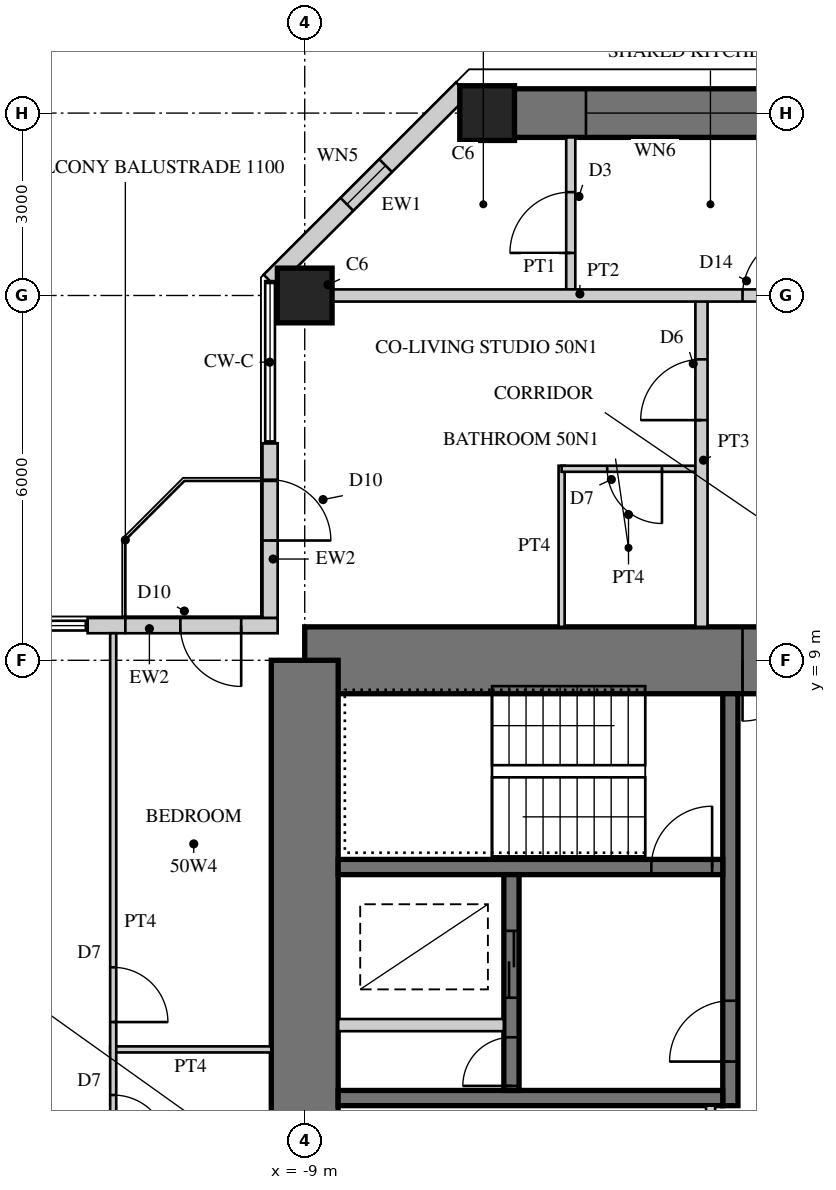
"""IFC4 building model, lengths in metres.
Left out: names, types, materials, properties, quantities, classifications, styles, units other than length and angle.
Written with IfcOpenShell. Run it as: python <this file> out.ifc"""

import sys

from ifc_helpers import new_model, si_unit, direction, frame, frame_2d, origin, origin_2d, place, context, subcontext, project, spatial, rectangle, hollow_rectangle, extrude, element, fill, save


model = new_model("IFC4")
c1 = context("Model", 3, precision=1e-05, world=origin(), true_north=direction((0.0, 1.0)))
c2 = subcontext(c1, "Body", "Model", "MODEL_VIEW")
j1 = project(units=[si_unit("LENGTHUNIT", "METRE"), si_unit("PLANEANGLEUNIT", "RADIAN")], contexts=[c1])
p1 = place(None, origin())
s1 = spatial("IfcSite", under=j1, at=p1, CompositionType="ELEMENT")
p2 = place(p1, origin())
s2 = spatial("IfcBuilding", under=s1, at=p2, CompositionType="ELEMENT")
p3 = place(p2, frame((0.0, 0.0, 200.1)))
s3 = spatial("IfcBuildingStorey", under=s2, at=p3, CompositionType="ELEMENT", Elevation=200.1)
p4 = place(p3, frame((9.0, 9.0, 0.0), z_axis=(0.0, 0.0, 1.0), x_axis=(-1.0, 0.0, 0.0)))
e1 = element("IfcWall", 1, at=p4, inside=s3, PredefinedType="SHEAR", context=c2, shape_type="SweptSolid", body=[
    extrude(rectangle(XDim=18.0, YDim=1.1, at=frame_2d((9.0, 0.0))), origin(), (0.0, 0.0, 1.0), 3.4),
])
p5 = place(p4, frame((9.8, 0.0, 0.0)))
e2 = element("IfcOpeningElement", 2, at=p5, cuts=e1, PredefinedType="OPENING", context=c2, shape_type="SweptSolid", body=[
    extrude(rectangle(XDim=1.0, YDim=2.4, at=frame_2d((0.5, 1.2))), frame((0.0, 0.56, 0.0), z_axis=(0.0, -1.0, 0.0), x_axis=(1.0, 0.0, 0.0)), (0.0, 0.0, 1.0), 1.12),
])
p6 = place(p3, frame((-9.0, 9.0, 0.0), z_axis=(0.0, 0.0, 1.0), x_axis=(0.0, -1.0, 0.0)))
e3 = element("IfcWall", 3, at=p6, inside=s3, PredefinedType="SHEAR", context=c2, shape_type="SweptSolid", body=[
    extrude(rectangle(XDim=18.0, YDim=1.1, at=frame_2d((9.0, 0.0))), origin(), (0.0, 0.0, 1.0), 3.4),
])
p7 = place(p6, frame((9.8, 0.0, 0.0)))
e4 = element("IfcOpeningElement", 4, at=p7, cuts=e3, PredefinedType="OPENING", context=c2, shape_type="SweptSolid", body=[
    extrude(rectangle(XDim=1.0, YDim=2.4, at=frame_2d((0.5, 1.2))), frame((0.0, 0.56, 0.0), z_axis=(0.0, -1.0, 0.0), x_axis=(1.0, 0.0, 0.0)), (0.0, 0.0, 1.0), 1.12),
])
p8 = place(p3, frame((-2.0, 1.675, 0.0), z_axis=(0.0, 0.0, 1.0), x_axis=(0.0, 1.0, 0.0)))
e5 = element("IfcWall", 5, at=p8, inside=s3, PredefinedType="SHEAR", context=c2, shape_type="SweptSolid", body=[
    extrude(rectangle(XDim=6.775, YDim=0.25, at=frame_2d((3.387, 0.0))), origin(), (0.0, 0.0, 1.0), 3.4),
])
p9 = place(p8, frame((0.725, 0.0, 0.0)))
e6 = element("IfcOpeningElement", 6, at=p9, cuts=e5, PredefinedType="OPENING", context=c2, shape_type="SweptSolid", body=[
    extrude(rectangle(XDim=1.0, YDim=2.1, at=frame_2d((0.5, 1.05))), frame((0.0, 0.135, 0.0), z_axis=(0.0, -1.0, 0.0), x_axis=(1.0, 0.0, 0.0)), (0.0, 0.0, 1.0), 0.27),
])
p10 = place(p3, frame((-2.125, 1.8, 0.0), z_axis=(0.0, 0.0, 1.0), x_axis=(-1.0, 0.0, 0.0)))
e7 = element("IfcWall", 7, at=p10, inside=s3, PredefinedType="SHEAR", context=c2, shape_type="SweptSolid", body=[
    extrude(rectangle(XDim=6.325, YDim=0.25, at=frame_2d((3.163, 0.0))), origin(), (0.0, 0.0, 1.0), 3.4),
])
p11 = place(p3, frame((-2.125, 5.6, 0.0), z_axis=(0.0, 0.0, 1.0), x_axis=(-1.0, 0.0, 0.0)))
e8 = element("IfcWall", 8, at=p11, inside=s3, PredefinedType="SHEAR", context=c2, shape_type="SweptSolid", body=[
    extrude(rectangle(XDim=6.325, YDim=0.25, at=frame_2d((3.163, 0.0))), origin(), (0.0, 0.0, 1.0), 3.4),
])
p12 = place(p11, frame((0.175, 0.0, 0.0)))
e9 = element("IfcOpeningElement", 9, at=p12, cuts=e8, PredefinedType="OPENING", context=c2, shape_type="SweptSolid", body=[
    extrude(rectangle(XDim=1.0, YDim=2.1, at=frame_2d((0.5, 1.05))), frame((0.0, 0.135, 0.0), z_axis=(0.0, -1.0, 0.0), x_axis=(1.0, 0.0, 0.0)), (0.0, 0.0, 1.0), 0.27),
])
p13 = place(p3, frame((-5.6, 1.925, 0.0), z_axis=(0.0, 0.0, 1.0), x_axis=(0.0, 1.0, 0.0)))
e10 = element("IfcWall", 10, at=p13, inside=s3, PredefinedType="SHEAR", context=c2, shape_type="SweptSolid", body=[
    extrude(rectangle(XDim=3.55, YDim=0.25, at=frame_2d((1.775, 0.0))), origin(), (0.0, 0.0, 1.0), 3.4),
])
p14 = place(p13, frame((1.525, 0.0, 0.0)))
e11 = element("IfcOpeningElement", 11, at=p14, cuts=e10, PredefinedType="OPENING", context=c2, shape_type="SweptSolid", body=[
    extrude(rectangle(XDim=1.1, YDim=2.2, at=frame_2d((0.55, 1.1))), frame((0.0, 0.135, 0.0), z_axis=(0.0, -1.0, 0.0), x_axis=(1.0, 0.0, 0.0)), (0.0, 0.0, 1.0), 0.27),
])
p15 = place(p13, frame((0.075, 0.0, 0.0)))
e12 = element("IfcOpeningElement", 12, at=p15, cuts=e10, PredefinedType="OPENING", context=c2, shape_type="SweptSolid", body=[
    extrude(rectangle(XDim=0.8, YDim=2.1, at=frame_2d((0.4, 1.05))), frame((0.0, 0.135, 0.0), z_axis=(0.0, -1.0, 0.0), x_axis=(1.0, 0.0, 0.0)), (0.0, 0.0, 1.0), 0.27),
])
p16 = place(p3, frame((-5.725, 3.0, 0.0), z_axis=(0.0, 0.0, 1.0), x_axis=(-1.0, 0.0, 0.0)))
e13 = element("IfcWall", 13, at=p16, inside=s3, PredefinedType="PARTITIONING", context=c2, shape_type="SweptSolid", body=[
    extrude(rectangle(XDim=2.725, YDim=0.2, at=frame_2d((1.362, 0.0))), origin(), (0.0, 0.0, 1.0), 3.4),
])
p17 = place(p3, frame((6.0, 18.0, 0.0), z_axis=(0.0, 0.0, 1.0), x_axis=(-1.0, 0.0, 0.0)))
e14 = element("IfcWall", 14, at=p17, inside=s3, PredefinedType="SHEAR", context=c2, shape_type="SweptSolid", body=[
    extrude(rectangle(XDim=12.0, YDim=0.8, at=frame_2d((6.0, 0.0))), origin(), (0.0, 0.0, 1.0), 3.4),
])
p18 = place(p17, frame((1.625, 0.0, 0.6)))
e15 = element("IfcOpeningElement", 15, at=p18, cuts=e14, PredefinedType="OPENING", context=c2, shape_type="SweptSolid", body=[
    extrude(rectangle(XDim=3.0, YDim=2.4, at=frame_2d((1.5, 1.2))), frame((0.0, 0.41, 0.0), z_axis=(0.0, -1.0, 0.0), x_axis=(1.0, 0.0, 0.0)), (0.0, 0.0, 1.0), 0.82),
])
p19 = place(p17, frame((7.375, 0.0, 0.6)))
e16 = element("IfcOpeningElement", 16, at=p19, cuts=e14, PredefinedType="OPENING", context=c2, shape_type="SweptSolid", body=[
    extrude(rectangle(XDim=3.0, YDim=2.4, at=frame_2d((1.5, 1.2))), frame((0.0, 0.41, 0.0), z_axis=(0.0, -1.0, 0.0), x_axis=(1.0, 0.0, 0.0)), (0.0, 0.0, 1.0), 0.82),
])
for number, where, z_axis, x_axis in (
    (17, (-9.0, 15.0, 0.0), (0.0, 0.0, 1.0), (1.0, 0.0, 0.0)),
    (18, (-6.0, 18.0, 0.0), (0.0, 0.0, 1.0), (1.0, 0.0, 0.0)),
):
    element("IfcColumn", number, at=place(p3, frame(where, z_axis=z_axis, x_axis=x_axis)), inside=s3, PredefinedType="COLUMN", context=c2, shape_type="SweptSolid", body=[
        extrude(rectangle(XDim=0.9, YDim=0.9, at=origin_2d()), origin(), (0.0, 0.0, 1.0), 3.4),
    ])
p20 = place(p3, frame((-6.406, 18.4, 0.0), z_axis=(0.0, 0.0, 1.0), x_axis=(-0.707134062067, -0.707079499254, 0.0)))
e19 = element("IfcWall", 19, at=p20, inside=s3, PredefinedType="SOLIDWALL", context=c2, shape_type="SweptSolid", body=[
    extrude(rectangle(XDim=4.475, YDim=0.3, at=frame_2d((2.237, 0.0))), origin(), (0.0, 0.0, 1.0), 3.22),
])
p21 = place(p20, frame((1.787, 0.0, 0.3)))
e20 = element("IfcOpeningElement", 20, at=p21, cuts=e19, PredefinedType="OPENING", context=c2, shape_type="SweptSolid", body=[
    extrude(rectangle(XDim=0.9, YDim=2.4, at=frame_2d((0.45, 1.2))), frame((0.0, 0.16, 0.0), z_axis=(0.0, -1.0, 0.0), x_axis=(1.0, 0.0, 0.0)), (0.0, 0.0, 1.0), 0.32),
])
p22 = place(p3, frame((-9.57, 12.57, 0.0), z_axis=(0.0, 0.0, 1.0), x_axis=(0.0, -1.0, 0.0)))
e21 = element("IfcWall", 21, at=p22, inside=s3, PredefinedType="SOLIDWALL", context=c2, shape_type="SweptSolid", body=[
    extrude(rectangle(XDim=2.875, YDim=0.25, at=frame_2d((1.438, 0.0))), origin(), (0.0, 0.0, 1.0), 3.22),
])
p23 = place(p22, frame((0.6, 0.0, 0.0)))
e22 = element("IfcOpeningElement", 22, at=p23, cuts=e21, PredefinedType="OPENING", context=c2, shape_type="SweptSolid", body=[
    extrude(rectangle(XDim=1.0, YDim=2.2, at=frame_2d((0.5, 1.1))), frame((0.0, 0.135, 0.0), z_axis=(0.0, -1.0, 0.0), x_axis=(1.0, 0.0, 0.0)), (0.0, 0.0, 1.0), 0.27),
])
p24 = place(p3, frame((-9.445, 9.57, 0.0), z_axis=(0.0, 0.0, 1.0), x_axis=(-1.0, 0.0, 0.0)))
e23 = element("IfcWall", 23, at=p24, inside=s3, PredefinedType="SOLIDWALL", context=c2, shape_type="SweptSolid", body=[
    extrude(rectangle(XDim=3.125, YDim=0.25, at=frame_2d((1.562, 0.0))), origin(), (0.0, 0.0, 1.0), 3.22),
])
p25 = place(p24, frame((0.6, 0.0, 0.0)))
e24 = element("IfcOpeningElement", 24, at=p25, cuts=e23, PredefinedType="OPENING", context=c2, shape_type="SweptSolid", body=[
    extrude(rectangle(XDim=1.0, YDim=2.2, at=frame_2d((0.5, 1.1))), frame((0.0, 0.135, 0.0), z_axis=(0.0, -1.0, 0.0), x_axis=(1.0, 0.0, 0.0)), (0.0, 0.0, 1.0), 0.27),
])
p26 = place(p3, frame((-2.325, 1.675, 0.0), z_axis=(0.0, 0.0, 1.0), x_axis=(0.0, -1.0, 0.0)))
e25 = element("IfcWall", 25, at=p26, inside=s3, PredefinedType="PARTITIONING", context=c2, shape_type="SweptSolid", body=[
    extrude(rectangle(XDim=1.95, YDim=0.15, at=frame_2d((0.975, 0.0))), origin(), (0.0, 0.0, 1.0), 3.22),
])
p27 = place(p3, frame((-4.775, 9.55, 0.0), z_axis=(0.0, 0.0, 1.0), x_axis=(0.0, 1.0, 0.0)))
e26 = element("IfcWall", 26, at=p27, inside=s3, PredefinedType="PARTITIONING", context=c2, shape_type="SweptSolid", body=[
    extrude(rectangle(XDim=2.65, YDim=0.1, at=frame_2d((1.325, 0.0))), origin(), (0.0, 0.0, 1.0), 3.22),
])
p28 = place(p3, frame((-2.575, 12.15, 0.0), z_axis=(0.0, 0.0, 1.0), x_axis=(-1.0, 0.0, 0.0)))
e27 = element("IfcWall", 27, at=p28, inside=s3, PredefinedType="PARTITIONING", context=c2, shape_type="SweptSolid", body=[
    extrude(rectangle(XDim=2.2, YDim=0.1, at=frame_2d((1.1, 0.0))), origin(), (0.0, 0.0, 1.0), 3.22),
])
p29 = place(p28, frame((0.55, 0.0, 0.0)))
e28 = element("IfcOpeningElement", 28, at=p29, cuts=e27, PredefinedType="OPENING", context=c2, shape_type="SweptSolid", body=[
    extrude(rectangle(XDim=0.9, YDim=2.1, at=frame_2d((0.45, 1.05))), frame((0.0, 0.06, 0.0), z_axis=(0.0, -1.0, 0.0), x_axis=(1.0, 0.0, 0.0)), (0.0, 0.0, 1.0), 0.12),
])
p30 = place(p3, frame((-2.475, 9.55, 0.0), z_axis=(0.0, 0.0, 1.0), x_axis=(0.0, 1.0, 0.0)))
e29 = element("IfcWall", 29, at=p30, inside=s3, PredefinedType="SOLIDWALL", context=c2, shape_type="SweptSolid", body=[
    extrude(rectangle(XDim=5.45, YDim=0.2, at=frame_2d((2.725, 0.0))), origin(), (0.0, 0.0, 1.0), 3.22),
])
p31 = place(p30, frame((3.4, 0.0, 0.0)))
e30 = element("IfcOpeningElement", 30, at=p31, cuts=e29, PredefinedType="OPENING", context=c2, shape_type="SweptSolid", body=[
    extrude(rectangle(XDim=1.0, YDim=2.15, at=frame_2d((0.5, 1.075))), frame((0.0, 0.11, 0.0), z_axis=(0.0, -1.0, 0.0), x_axis=(1.0, 0.0, 0.0)), (0.0, 0.0, 1.0), 0.22),
])
p32 = place(p3, frame((-4.625, 15.1, 0.0), z_axis=(0.0, 0.0, 1.0), x_axis=(0.0, 1.0, 0.0)))
e31 = element("IfcWall", 31, at=p32, inside=s3, PredefinedType="PARTITIONING", context=c2, shape_type="SweptSolid", body=[
    extrude(rectangle(XDim=2.5, YDim=0.15, at=frame_2d((1.25, 0.0))), origin(), (0.0, 0.0, 1.0), 3.22),
])
p33 = place(p32, frame((0.6, 0.0, 0.0)))
e32 = element("IfcOpeningElement", 32, at=p33, cuts=e31, PredefinedType="OPENING", context=c2, shape_type="SweptSolid", body=[
    extrude(rectangle(XDim=1.0, YDim=2.1, at=frame_2d((0.5, 1.05))), frame((0.0, 0.085, 0.0), z_axis=(0.0, -1.0, 0.0), x_axis=(1.0, 0.0, 0.0)), (0.0, 0.0, 1.0), 0.17),
])
p34 = place(p3, frame((-0.4, 15.0, 0.0), z_axis=(0.0, 0.0, 1.0), x_axis=(-1.0, 0.0, 0.0)))
e33 = element("IfcWall", 33, at=p34, inside=s3, PredefinedType="SOLIDWALL", context=c2, shape_type="SweptSolid", body=[
    extrude(rectangle(XDim=8.15, YDim=0.2, at=frame_2d((4.075, 0.0))), origin(), (0.0, 0.0, 1.0), 2.47),
])
p35 = place(p34, frame((0.4, 0.0, 0.0)))
e34 = element("IfcOpeningElement", 34, at=p35, cuts=e33, PredefinedType="OPENING", context=c2, shape_type="SweptSolid", body=[
    extrude(rectangle(XDim=1.0, YDim=2.2, at=frame_2d((0.5, 1.1))), frame((0.0, 0.11, 0.0), z_axis=(0.0, -1.0, 0.0), x_axis=(1.0, 0.0, 0.0)), (0.0, 0.0, 1.0), 0.22),
])
p36 = place(p3, frame((-9.55, 2.6, 0.0), z_axis=(0.0, 0.0, 1.0), x_axis=(-1.0, 0.0, 0.0)))
e35 = element("IfcWall", 35, at=p36, inside=s3, PredefinedType="PARTITIONING", context=c2, shape_type="SweptSolid", body=[
    extrude(rectangle(XDim=2.65, YDim=0.1, at=frame_2d((1.325, 0.0))), origin(), (0.0, 0.0, 1.0), 3.22),
])
p37 = place(p3, frame((-12.15, 9.445, 0.0), z_axis=(0.0, 0.0, 1.0), x_axis=(0.0, -1.0, 0.0)))
e36 = element("IfcWall", 36, at=p37, inside=s3, PredefinedType="PARTITIONING", context=c2, shape_type="SweptSolid", body=[
    extrude(rectangle(XDim=9.045, YDim=0.1, at=frame_2d((4.522, 0.0))), origin(), (0.0, 0.0, 1.0), 3.22),
])
p38 = place(p37, frame((5.495, 0.0, 0.0)))
e37 = element("IfcOpeningElement", 37, at=p38, cuts=e36, PredefinedType="OPENING", context=c2, shape_type="SweptSolid", body=[
    extrude(rectangle(XDim=0.9, YDim=2.1, at=frame_2d((0.45, 1.05))), frame((0.0, 0.06, 0.0), z_axis=(0.0, -1.0, 0.0), x_axis=(1.0, 0.0, 0.0)), (0.0, 0.0, 1.0), 0.12),
])
p39 = place(p37, frame((7.595, 0.0, 0.0)))
e38 = element("IfcOpeningElement", 38, at=p39, cuts=e36, PredefinedType="OPENING", context=c2, shape_type="SweptSolid", body=[
    extrude(rectangle(XDim=0.9, YDim=2.1, at=frame_2d((0.45, 1.05))), frame((0.0, 0.06, 0.0), z_axis=(0.0, -1.0, 0.0), x_axis=(1.0, 0.0, 0.0)), (0.0, 0.0, 1.0), 0.12),
])
p40 = place(p19, origin())
e39 = element("IfcWindow", 39, at=p40, inside=s3, PartitioningType="SINGLE_PANEL", PredefinedType="WINDOW", context=c2, shape_type="SweptSolid", body=[
    extrude(hollow_rectangle(XDim=3.0, YDim=2.4, WallThickness=0.06, at=frame_2d((1.5, 1.2))), frame((0.0, 0.03, 0.0), z_axis=(0.0, -1.0, 0.0), x_axis=(1.0, 0.0, 0.0)), (0.0, 0.0, 1.0), 0.06),
    extrude(rectangle(XDim=2.879, YDim=2.279, at=frame_2d((1.5, 1.2))), frame((0.0, 0.03, 0.0), z_axis=(0.0, -1.0, 0.0), x_axis=(1.0, 0.0, 0.0)), (0.0, 0.0, 1.0), 0.06),
])
fill(e16, e39)
p41 = place(p21, origin())
e40 = element("IfcWindow", 40, at=p41, inside=s3, PartitioningType="SINGLE_PANEL", PredefinedType="WINDOW", context=c2, shape_type="SweptSolid", body=[
    extrude(hollow_rectangle(XDim=0.9, YDim=2.4, WallThickness=0.06, at=frame_2d((0.45, 1.2))), frame((0.0, 0.03, 0.0), z_axis=(0.0, -1.0, 0.0), x_axis=(1.0, 0.0, 0.0)), (0.0, 0.0, 1.0), 0.06),
    extrude(rectangle(XDim=0.779, YDim=2.279, at=frame_2d((0.45, 1.2))), frame((0.0, 0.03, 0.0), z_axis=(0.0, -1.0, 0.0), x_axis=(1.0, 0.0, 0.0)), (0.0, 0.0, 1.0), 0.06),
])
fill(e20, e40)
p42 = place(p23, origin())
e41 = element("IfcDoor", 41, at=p42, inside=s3, OperationType="SINGLE_SWING_RIGHT", PredefinedType="DOOR", context=c2, shape_type="SweptSolid", body=[
    extrude(hollow_rectangle(XDim=1.0, YDim=2.2, WallThickness=0.06, at=frame_2d((0.5, 1.1))), frame((0.0, 0.025, 0.0), z_axis=(0.0, -1.0, 0.0), x_axis=(1.0, 0.0, 0.0)), (0.0, 0.0, 1.0), 0.05),
    extrude(rectangle(XDim=0.879, YDim=2.079, at=frame_2d((0.5, 1.1))), frame((0.0, 0.025, 0.0), z_axis=(0.0, -1.0, 0.0), x_axis=(1.0, 0.0, 0.0)), (0.0, 0.0, 1.0), 0.05),
])
fill(e22, e41)
p43 = place(p25, origin())
e42 = element("IfcDoor", 42, at=p43, inside=s3, OperationType="SINGLE_SWING_LEFT", PredefinedType="DOOR", context=c2, shape_type="SweptSolid", body=[
    extrude(hollow_rectangle(XDim=1.0, YDim=2.2, WallThickness=0.06, at=frame_2d((0.5, 1.1))), frame((0.0, 0.025, 0.0), z_axis=(0.0, -1.0, 0.0), x_axis=(1.0, 0.0, 0.0)), (0.0, 0.0, 1.0), 0.05),
    extrude(rectangle(XDim=0.879, YDim=2.079, at=frame_2d((0.5, 1.1))), frame((0.0, 0.025, 0.0), z_axis=(0.0, -1.0, 0.0), x_axis=(1.0, 0.0, 0.0)), (0.0, 0.0, 1.0), 0.05),
])
fill(e24, e42)
p44 = place(p29, origin())
e43 = element("IfcDoor", 43, at=p44, inside=s3, OperationType="SINGLE_SWING_LEFT", PredefinedType="DOOR", context=c2, shape_type="SweptSolid", body=[
    extrude(rectangle(XDim=0.9, YDim=2.1, at=frame_2d((0.45, 1.05))), frame((0.0, 0.025, 0.0), z_axis=(0.0, -1.0, 0.0), x_axis=(1.0, 0.0, 0.0)), (0.0, 0.0, 1.0), 0.05),
])
fill(e28, e43)
p45 = place(p31, origin())
e44 = element("IfcDoor", 44, at=p45, inside=s3, OperationType="SINGLE_SWING_LEFT", PredefinedType="DOOR", context=c2, shape_type="SweptSolid", body=[
    extrude(rectangle(XDim=1.0, YDim=2.15, at=frame_2d((0.5, 1.075))), frame((0.0, 0.025, 0.0), z_axis=(0.0, -1.0, 0.0), x_axis=(1.0, 0.0, 0.0)), (0.0, 0.0, 1.0), 0.05),
])
fill(e30, e44)
p46 = place(p33, origin())
e45 = element("IfcDoor", 45, at=p46, inside=s3, OperationType="SINGLE_SWING_LEFT", PredefinedType="DOOR", context=c2, shape_type="SweptSolid", body=[
    extrude(rectangle(XDim=1.0, YDim=2.1, at=frame_2d((0.5, 1.05))), frame((0.0, 0.025, 0.0), z_axis=(0.0, -1.0, 0.0), x_axis=(1.0, 0.0, 0.0)), (0.0, 0.0, 1.0), 0.05),
])
fill(e32, e45)
p47 = place(p35, frame((1.0, 0.0, 0.0), z_axis=(0.0, 0.0, 1.0), x_axis=(-1.0, 0.0, 0.0)))
e46 = element("IfcDoor", 46, at=p47, inside=s3, OperationType="SINGLE_SWING_RIGHT", PredefinedType="DOOR", context=c2, shape_type="SweptSolid", body=[
    extrude(rectangle(XDim=1.0, YDim=2.2, at=frame_2d((0.5, 1.1))), frame((0.0, 0.025, 0.0), z_axis=(0.0, -1.0, 0.0), x_axis=(1.0, 0.0, 0.0)), (0.0, 0.0, 1.0), 0.05),
])
fill(e34, e46)
p48 = place(p38, origin())
e47 = element("IfcDoor", 47, at=p48, inside=s3, OperationType="SINGLE_SWING_RIGHT", PredefinedType="DOOR", context=c2, shape_type="SweptSolid", body=[
    extrude(rectangle(XDim=0.9, YDim=2.1, at=frame_2d((0.45, 1.05))), frame((0.0, 0.025, 0.0), z_axis=(0.0, -1.0, 0.0), x_axis=(1.0, 0.0, 0.0)), (0.0, 0.0, 1.0), 0.05),
])
fill(e37, e47)
p49 = place(p39, origin())
e48 = element("IfcDoor", 48, at=p49, inside=s3, OperationType="SINGLE_SWING_RIGHT", PredefinedType="DOOR", context=c2, shape_type="SweptSolid", body=[
    extrude(rectangle(XDim=0.9, YDim=2.1, at=frame_2d((0.45, 1.05))), frame((0.0, 0.025, 0.0), z_axis=(0.0, -1.0, 0.0), x_axis=(1.0, 0.0, 0.0)), (0.0, 0.0, 1.0), 0.05),
])
fill(e38, e48)
p50 = place(p5, origin())
e49 = element("IfcDoor", 49, at=p50, inside=s3, OperationType="SINGLE_SWING_RIGHT", PredefinedType="DOOR", context=c2, shape_type="SweptSolid", body=[
    extrude(rectangle(XDim=1.0, YDim=2.4, at=frame_2d((0.5, 1.2))), frame((0.0, 0.055, 0.0), z_axis=(0.0, -1.0, 0.0), x_axis=(1.0, 0.0, 0.0)), (0.0, 0.0, 1.0), 0.05),
])
fill(e2, e49)
p51 = place(p9, origin())
e50 = element("IfcDoor", 50, at=p51, inside=s3, OperationType="SINGLE_SWING_LEFT", PredefinedType="DOOR", context=c2, shape_type="SweptSolid", body=[
    extrude(rectangle(XDim=1.0, YDim=2.1, at=frame_2d((0.5, 1.05))), frame((0.0, 0.025, 0.0), z_axis=(0.0, -1.0, 0.0), x_axis=(1.0, 0.0, 0.0)), (0.0, 0.0, 1.0), 0.05),
])
fill(e6, e50)
p52 = place(p12, frame((1.0, 0.0, 0.0), z_axis=(0.0, 0.0, 1.0), x_axis=(-1.0, 0.0, 0.0)))
e51 = element("IfcDoor", 51, at=p52, inside=s3, OperationType="SINGLE_SWING_RIGHT", PredefinedType="DOOR", context=c2, shape_type="SweptSolid", body=[
    extrude(rectangle(XDim=1.0, YDim=2.1, at=frame_2d((0.5, 1.05))), frame((0.0, 0.025, 0.0), z_axis=(0.0, -1.0, 0.0), x_axis=(1.0, 0.0, 0.0)), (0.0, 0.0, 1.0), 0.05),
])
fill(e9, e51)
p53 = place(p14, origin())
e52 = element("IfcDoor", 52, at=p53, inside=s3, OperationType="DOUBLE_DOOR_SLIDING", PredefinedType="DOOR", context=c2, shape_type="SweptSolid", body=[
    extrude(rectangle(XDim=1.1, YDim=2.2, at=frame_2d((0.55, 1.1))), frame((0.0, 0.025, 0.0), z_axis=(0.0, -1.0, 0.0), x_axis=(1.0, 0.0, 0.0)), (0.0, 0.0, 1.0), 0.05),
])
fill(e11, e52)
p54 = place(p15, origin())
e53 = element("IfcDoor", 53, at=p54, inside=s3, OperationType="SINGLE_SWING_LEFT", PredefinedType="DOOR", context=c2, shape_type="SweptSolid", body=[
    extrude(rectangle(XDim=0.8, YDim=2.1, at=frame_2d((0.4, 1.05))), frame((0.0, 0.025, 0.0), z_axis=(0.0, -1.0, 0.0), x_axis=(1.0, 0.0, 0.0)), (0.0, 0.0, 1.0), 0.05),
])
fill(e12, e53)
save(model, sys.argv[1])
